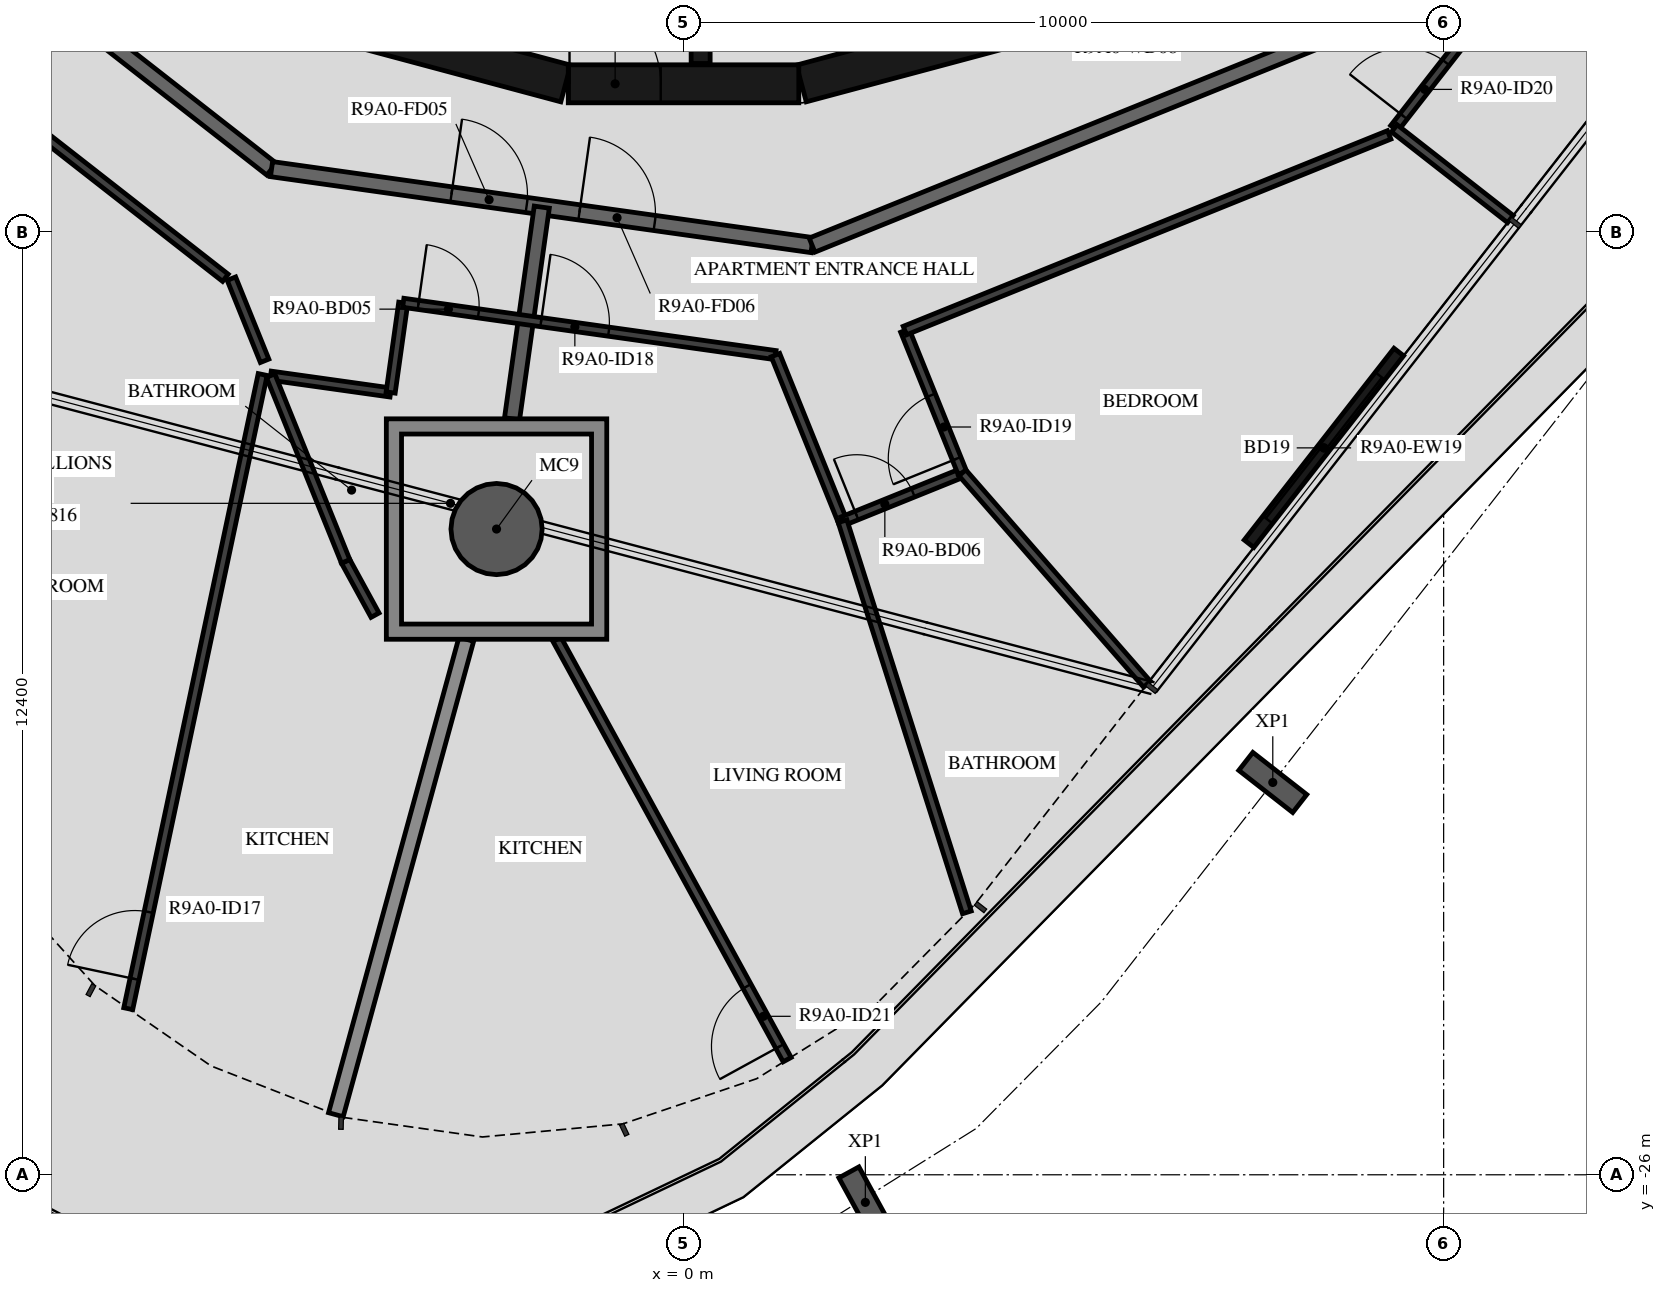
"""IFC4 building model, lengths in metres.
Left out: names, types, materials, properties, quantities, classifications, styles, units other than length and angle.
Written with IfcOpenShell. Run it as: python <this file> out.ifc"""

import sys

from ifc_helpers import new_model, si_unit, direction, frame, frame_2d, origin, origin_2d, place, context, subcontext, project, spatial, polyline, rectangle, hollow_circle, i_section, outline, extrude, element, fill, save


model = new_model("IFC4")
c1 = context("Model", 3, precision=1e-05, world=origin(), true_north=direction((0.0, 1.0)))
c2 = subcontext(c1, "Body", "Model", "MODEL_VIEW")
j1 = project(units=[si_unit("LENGTHUNIT", "METRE"), si_unit("PLANEANGLEUNIT", "RADIAN")], contexts=[c1])
p1 = place(None, origin())
s1 = spatial("IfcSite", under=j1, at=p1, CompositionType="ELEMENT")
p2 = place(p1, origin())
s2 = spatial("IfcBuilding", under=s1, at=p2, CompositionType="ELEMENT")
p3 = place(p2, frame((0.0, 0.0, 333.0)))
s3 = spatial("IfcBuildingStorey", under=s2, at=p3, CompositionType="ELEMENT", Elevation=333.0)
p4 = place(p3, frame((-2.46, -17.505, -0.45), z_axis=(0.0, 0.0, 1.0), x_axis=(1.0, 0.0, 0.0)))
e1 = element("IfcColumn", 1, at=p4, inside=s3, PredefinedType="COLUMN", context=c2, shape_type="SweptSolid", body=[
    extrude(hollow_circle(Radius=0.6, WallThickness=0.03, at=origin_2d()), origin(), (0.0, 0.0, 1.0), 3.57),
])
for number, where, z_axis, x_axis in (
    (2, (2.392, -26.363, -0.45), (0.0, 0.0, 1.0), (-0.877, -0.48, 0.0)),
    (3, (7.752, -20.839, -0.45), (0.0, 0.0, 1.0), (-0.616, -0.788, 0.0)),
):
    element("IfcColumn", number, at=place(p3, frame(where, z_axis=z_axis, x_axis=x_axis)), inside=s3, PredefinedType="COLUMN", context=c2, shape_type="SweptSolid", body=[
        extrude(i_section(OverallWidth=0.3, OverallDepth=0.9, WebThickness=0.019, FlangeThickness=0.035, FilletRadius=0.03, at=origin_2d()), origin(), (0.0, 0.0, 1.0), 3.57),
    ])
p5 = place(p3, frame((7.44, -17.698, 0.0), z_axis=(0.0, 0.0, 1.0), x_axis=(0.615666248856, 0.788007024093, 0.0)))
e4 = element("IfcWall", 4, at=p5, inside=s3, PredefinedType="STANDARD", context=c2, shape_type="SweptSolid", body=[
    extrude(rectangle(XDim=3.2, YDim=0.16, at=frame_2d((1.6, 0.0))), origin(), (0.0, 0.0, 1.0), 3.12),
])
p6 = place(p5, frame((0.4, 0.0, 0.0)))
e5 = element("IfcOpeningElement", 5, at=p6, cuts=e4, PredefinedType="OPENING", context=c2, shape_type="SweptSolid", body=[
    extrude(rectangle(XDim=2.4, YDim=2.4, at=frame_2d((1.2, 1.2))), frame((0.0, 0.09, 0.0), z_axis=(0.0, -1.0, 0.0), x_axis=(1.0, 0.0, 0.0)), (0.0, 0.0, 1.0), 0.18),
])
for number, where, z_axis, x_axis in (
    (6, (1.55, -11.643, 0.0), (0.0, 0.0, 1.0), (0.966, 0.259, 0.0)),
    (7, (-4.479, -10.858, 0.0), (0.0, 0.0, 1.0), (0.966, -0.259, 0.0)),
):
    element("IfcWall", number, at=place(p3, frame(where, z_axis=z_axis, x_axis=x_axis)), inside=s3, PredefinedType="SHEAR", context=c2, shape_type="SweptSolid", body=[
        extrude(rectangle(XDim=3.033, YDim=0.5, at=frame_2d((1.516, 0.0))), origin(), (0.0, 0.0, 1.0), 3.12),
    ])
p7 = place(p3, frame((-1.516, -11.647, 0.0), z_axis=(0.0, 0.0, 1.0), x_axis=(1.0, 0.0, 0.0)))
e8 = element("IfcWall", 8, at=p7, inside=s3, PredefinedType="SHEAR", context=c2, shape_type="SweptSolid", body=[
    extrude(rectangle(XDim=3.033, YDim=0.5, at=frame_2d((1.516, 0.0))), origin(), (0.0, 0.0, 1.0), 3.12),
])
p8 = place(p7, frame((0.016, 0.0, 0.0)))
e9 = element("IfcOpeningElement", 9, at=p8, cuts=e8, PredefinedType="OPENING", context=c2, shape_type="SweptSolid", body=[
    extrude(rectangle(XDim=1.2, YDim=2.1, at=frame_2d((0.6, 1.05))), frame((0.0, 0.26, 0.0), z_axis=(0.0, -1.0, 0.0), x_axis=(1.0, 0.0, 0.0)), (0.0, 0.0, 1.0), 0.52),
])
p9 = place(p3, frame((0.225, -8.97, 0.0), z_axis=(0.0, 0.0, 1.0), x_axis=(0.0, -1.0, 0.0)))
e10 = element("IfcWall", 10, at=p9, inside=s3, PredefinedType="SHEAR", context=c2, shape_type="SweptSolid", body=[
    extrude(rectangle(XDim=2.41, YDim=0.25, at=frame_2d((1.205, 0.0))), origin(), (0.0, 0.0, 1.0), 3.12),
])
p10 = place(p3, frame((-11.079, -8.349, 0.0), z_axis=(0.0, 0.0, 1.0), x_axis=(0.78800478687, -0.615669112324, 0.0)))
e11 = element("IfcWall", 11, at=p10, inside=s3, PredefinedType="STANDARD", context=c2, shape_type="SweptSolid", body=[
    extrude(rectangle(XDim=7.181, YDim=0.2, at=frame_2d((3.591, 0.0))), origin(), (0.0, 0.0, 1.0), 3.12),
])
p11 = place(p3, frame((-5.42, -12.77, 0.0), z_axis=(0.0, 0.0, 1.0), x_axis=(0.990270565508, -0.139155334385, 0.0)))
e12 = element("IfcWall", 12, at=p11, inside=s3, PredefinedType="STANDARD", context=c2, shape_type="SweptSolid", body=[
    extrude(rectangle(XDim=7.181, YDim=0.2, at=frame_2d((3.59, 0.0))), origin(), (0.0, 0.0, 1.0), 3.12),
])
p12 = place(p11, frame((2.39, 0.0, 0.0)))
e13 = element("IfcOpeningElement", 13, at=p12, cuts=e12, PredefinedType="OPENING", context=c2, shape_type="SweptSolid", body=[
    extrude(rectangle(XDim=1.0, YDim=2.1, at=frame_2d((0.5, 1.05))), frame((0.0, 0.11, 0.0), z_axis=(0.0, -1.0, 0.0), x_axis=(1.0, 0.0, 0.0)), (0.0, 0.0, 1.0), 0.22),
])
p13 = place(p11, frame((4.091, 0.0, 0.0)))
e14 = element("IfcOpeningElement", 14, at=p13, cuts=e12, PredefinedType="OPENING", context=c2, shape_type="SweptSolid", body=[
    extrude(rectangle(XDim=1.0, YDim=2.1, at=frame_2d((0.5, 1.05))), frame((0.0, 0.11, 0.0), z_axis=(0.0, -1.0, 0.0), x_axis=(1.0, 0.0, 0.0)), (0.0, 0.0, 1.0), 0.22),
])
p14 = place(p3, frame((1.691, -13.769, 0.0), z_axis=(0.0, 0.0, 1.0), x_axis=(0.92717916932, 0.374618189599, 0.0)))
e15 = element("IfcWall", 15, at=p14, inside=s3, PredefinedType="STANDARD", context=c2, shape_type="SweptSolid", body=[
    extrude(rectangle(XDim=7.181, YDim=0.2, at=frame_2d((3.591, 0.0))), origin(), (0.0, 0.0, 1.0), 3.12),
])
p15 = place(p3, frame((-2.256, -16.055, 0.0), z_axis=(0.0, 0.0, 1.0), x_axis=(0.139148428478, 0.990271535919, 0.0)))
e16 = element("IfcWall", 16, at=p15, inside=s3, PredefinedType="STANDARD", context=c2, shape_type="SweptSolid", body=[
    extrude(rectangle(XDim=2.812, YDim=0.2, at=frame_2d((1.406, 0.0))), origin(), (0.0, 0.0, 1.0), 3.12),
])
p16 = place(p3, frame((-4.574, -25.21, 0.0), z_axis=(0.0, 0.0, 1.0), x_axis=(0.264579024648, 0.964364007892, 0.0)))
e17 = element("IfcWall", 17, at=p16, inside=s3, PredefinedType="STANDARD", context=c2, shape_type="SweptSolid", body=[
    extrude(rectangle(XDim=6.486, YDim=0.2, at=frame_2d((3.243, 0.0))), origin(), (0.0, 0.0, 1.0), 2.73),
])
p17 = place(p3, frame((-12.319, -9.283, 0.0), z_axis=(0.0, 0.0, 1.0), x_axis=(0.788000268464, -0.61567489546, 0.0)))
e18 = element("IfcWall", 18, at=p17, inside=s3, PredefinedType="PARTITIONING", context=c2, shape_type="SweptSolid", body=[
    extrude(rectangle(XDim=7.985, YDim=0.12, at=frame_2d((3.992, 0.0))), origin(), (0.0, 0.0, 1.0), 3.12),
])
p18 = place(p17, frame((3.619, 0.0, 0.0)))
e19 = element("IfcOpeningElement", 19, at=p18, cuts=e18, PredefinedType="OPENING", context=c2, shape_type="SweptSolid", body=[
    extrude(rectangle(XDim=0.9, YDim=2.1, at=frame_2d((0.45, 1.05))), frame((0.0, 0.07, 0.0), z_axis=(0.0, -1.0, 0.0), x_axis=(1.0, 0.0, 0.0)), (0.0, 0.0, 1.0), 0.14),
])
p19 = place(p3, frame((-5.948, -14.21, 0.0), z_axis=(0.0, 0.0, 1.0), x_axis=(0.374601530156, -0.927185900241, 0.0)))
e20 = element("IfcWall", 20, at=p19, inside=s3, PredefinedType="PARTITIONING", context=c2, shape_type="SweptSolid", body=[
    extrude(rectangle(XDim=1.166, YDim=0.12, at=frame_2d((0.583, 0.0))), origin(), (0.0, 0.0, 1.0), 3.12),
])
p20 = place(p3, frame((-5.433, -15.487, 0.0), z_axis=(0.0, 0.0, 1.0), x_axis=(0.990268451053, -0.139170380644, 0.0)))
e21 = element("IfcWall", 21, at=p20, inside=s3, PredefinedType="PARTITIONING", context=c2, shape_type="SweptSolid", body=[
    extrude(rectangle(XDim=1.595, YDim=0.12, at=frame_2d((0.797, 0.0))), origin(), (0.0, 0.0, 1.0), 3.12),
])
p21 = place(p3, frame((-3.854, -15.708, 0.0), z_axis=(0.0, 0.0, 1.0), x_axis=(0.139298773474, 0.99025039849, 0.0)))
e22 = element("IfcWall", 22, at=p21, inside=s3, PredefinedType="PARTITIONING", context=c2, shape_type="SweptSolid", body=[
    extrude(rectangle(XDim=1.192, YDim=0.12, at=frame_2d((0.596, 0.0))), origin(), (0.0, 0.0, 1.0), 3.12),
])
p22 = place(p3, frame((-3.688, -14.528, 0.0), z_axis=(0.0, 0.0, 1.0), x_axis=(0.990273698817, -0.139133035013, 0.0)))
e23 = element("IfcWall", 23, at=p22, inside=s3, PredefinedType="PARTITIONING", context=c2, shape_type="SweptSolid", body=[
    extrude(rectangle(XDim=4.945, YDim=0.12, at=frame_2d((2.472, 0.0))), origin(), (0.0, 0.0, 1.0), 3.12),
])
p23 = place(p22, frame((0.2, 0.0, 0.0)))
e24 = element("IfcOpeningElement", 24, at=p23, cuts=e23, PredefinedType="OPENING", context=c2, shape_type="SweptSolid", body=[
    extrude(rectangle(XDim=0.8, YDim=2.1, at=frame_2d((0.4, 1.05))), frame((0.0, 0.07, 0.0), z_axis=(0.0, -1.0, 0.0), x_axis=(1.0, 0.0, 0.0)), (0.0, 0.0, 1.0), 0.14),
])
p24 = place(p22, frame((1.83, 0.0, 0.0)))
e25 = element("IfcOpeningElement", 25, at=p24, cuts=e23, PredefinedType="OPENING", context=c2, shape_type="SweptSolid", body=[
    extrude(rectangle(XDim=0.9, YDim=2.1, at=frame_2d((0.45, 1.05))), frame((0.0, 0.07, 0.0), z_axis=(0.0, -1.0, 0.0), x_axis=(1.0, 0.0, 0.0)), (0.0, 0.0, 1.0), 0.14),
])
p25 = place(p3, frame((-7.305, -23.815, 0.0), z_axis=(0.0, 0.0, 1.0), x_axis=(0.207366409306, 0.978263345062, 0.0)))
e26 = element("IfcWall", 26, at=p25, inside=s3, PredefinedType="PARTITIONING", context=c2, shape_type="SweptSolid", body=[
    extrude(rectangle(XDim=8.529, YDim=0.12, at=frame_2d((4.264, 0.0))), origin(), (0.0, 0.0, 1.0), 3.12),
])
p26 = place(p25, frame((0.4, 0.0, 0.0)))
e27 = element("IfcOpeningElement", 27, at=p26, cuts=e26, PredefinedType="OPENING", context=c2, shape_type="SweptSolid", body=[
    extrude(rectangle(XDim=0.9, YDim=2.1, at=frame_2d((0.45, 1.05))), frame((0.0, 0.07, 0.0), z_axis=(0.0, -1.0, 0.0), x_axis=(1.0, 0.0, 0.0)), (0.0, 0.0, 1.0), 0.14),
])
p27 = place(p3, frame((-4.059, -18.638, 0.0), z_axis=(0.0, 0.0, 1.0), x_axis=(-0.479488268542, 0.877548289458, 0.0)))
e28 = element("IfcWall", 28, at=p27, inside=s3, PredefinedType="PARTITIONING", context=c2, shape_type="SweptSolid", body=[
    extrude(rectangle(XDim=0.807, YDim=0.12, at=frame_2d((0.403, 0.0))), origin(), (0.0, 0.0, 1.0), 3.12),
])
p28 = place(p3, frame((-4.445, -17.93, 0.0), z_axis=(0.0, 0.0, 1.0), x_axis=(-0.374614676827, 0.927180588616, 0.0)))
e29 = element("IfcWall", 29, at=p28, inside=s3, PredefinedType="PARTITIONING", context=c2, shape_type="SweptSolid", body=[
    extrude(rectangle(XDim=2.635, YDim=0.12, at=frame_2d((1.318, 0.0))), origin(), (0.0, 0.0, 1.0), 3.12),
])
p29 = place(p3, frame((1.209, -15.216, 0.0), z_axis=(0.0, 0.0, 1.0), x_axis=(0.374531550488, -0.927214170345, 0.0)))
e30 = element("IfcWall", 30, at=p29, inside=s3, PredefinedType="PARTITIONING", context=c2, shape_type="SweptSolid", body=[
    extrude(rectangle(XDim=2.357, YDim=0.12, at=frame_2d((1.179, 0.0))), origin(), (0.0, 0.0, 1.0), 3.12),
])
p30 = place(p3, frame((2.092, -17.402, 0.0), z_axis=(0.0, 0.0, 1.0), x_axis=(0.927153589835, 0.374681492546, 0.0)))
e31 = element("IfcWall", 31, at=p30, inside=s3, PredefinedType="PARTITIONING", context=c2, shape_type="SweptSolid", body=[
    extrude(rectangle(XDim=1.7, YDim=0.12, at=frame_2d((0.85, 0.0))), origin(), (0.0, 0.0, 1.0), 3.12),
])
p31 = place(p30, frame((0.2, 0.0, 0.0)))
e32 = element("IfcOpeningElement", 32, at=p31, cuts=e31, PredefinedType="OPENING", context=c2, shape_type="SweptSolid", body=[
    extrude(rectangle(XDim=0.8, YDim=2.1, at=frame_2d((0.4, 1.05))), frame((0.0, 0.07, 0.0), z_axis=(0.0, -1.0, 0.0), x_axis=(1.0, 0.0, 0.0)), (0.0, 0.0, 1.0), 0.14),
])
p32 = place(p3, frame((3.668, -16.765, 0.0), z_axis=(0.0, 0.0, 1.0), x_axis=(-0.374621045498, 0.927178015416, 0.0)))
e33 = element("IfcWall", 33, at=p32, inside=s3, PredefinedType="PARTITIONING", context=c2, shape_type="SweptSolid", body=[
    extrude(rectangle(XDim=2.018, YDim=0.12, at=frame_2d((1.009, 0.0))), origin(), (0.0, 0.0, 1.0), 3.12),
])
p33 = place(p32, frame((0.2, 0.0, 0.0)))
e34 = element("IfcOpeningElement", 34, at=p33, cuts=e33, PredefinedType="OPENING", context=c2, shape_type="SweptSolid", body=[
    extrude(rectangle(XDim=0.9, YDim=2.1, at=frame_2d((0.45, 1.05))), frame((0.0, 0.07, 0.0), z_axis=(0.0, -1.0, 0.0), x_axis=(1.0, 0.0, 0.0)), (0.0, 0.0, 1.0), 0.14),
])
p34 = place(p3, frame((2.912, -14.894, 0.0), z_axis=(0.0, 0.0, 1.0), x_axis=(0.927182280165, 0.374610490174, 0.0)))
e35 = element("IfcWall", 35, at=p34, inside=s3, PredefinedType="PARTITIONING", context=c2, shape_type="SweptSolid", body=[
    extrude(rectangle(XDim=6.872, YDim=0.12, at=frame_2d((3.436, 0.0))), origin(), (0.0, 0.0, 1.0), 3.12),
])
p35 = place(p3, frame((9.351, -12.233, 0.0), z_axis=(0.0, 0.0, 1.0), x_axis=(0.615678207218, 0.787997680933, 0.0)))
e36 = element("IfcWall", 36, at=p35, inside=s3, PredefinedType="PARTITIONING", context=c2, shape_type="SweptSolid", body=[
    extrude(rectangle(XDim=7.765, YDim=0.12, at=frame_2d((3.883, 0.0))), origin(), (0.0, 0.0, 1.0), 3.12),
])
p36 = place(p35, frame((0.2, 0.0, 0.0)))
e37 = element("IfcOpeningElement", 37, at=p36, cuts=e36, PredefinedType="OPENING", context=c2, shape_type="SweptSolid", body=[
    extrude(rectangle(XDim=0.9, YDim=2.1, at=frame_2d((0.45, 1.05))), frame((0.0, 0.07, 0.0), z_axis=(0.0, -1.0, 0.0), x_axis=(1.0, 0.0, 0.0)), (0.0, 0.0, 1.0), 0.14),
])
p37 = place(p3, frame((1.363, -24.485, 0.0), z_axis=(0.0, 0.0, 1.0), x_axis=(-0.480397592444, 0.877050827018, 0.0)))
e38 = element("IfcWall", 38, at=p37, inside=s3, PredefinedType="PARTITIONING", context=c2, shape_type="SweptSolid", body=[
    extrude(rectangle(XDim=6.306, YDim=0.12, at=frame_2d((3.153, 0.0))), origin(), (0.0, 0.0, 1.0), 2.73),
])
p38 = place(p37, frame((0.2, 0.0, 0.0)))
e39 = element("IfcOpeningElement", 39, at=p38, cuts=e38, PredefinedType="OPENING", context=c2, shape_type="SweptSolid", body=[
    extrude(rectangle(XDim=0.9, YDim=2.1, at=frame_2d((0.45, 1.05))), frame((0.0, 0.07, 0.0), z_axis=(0.0, -1.0, 0.0), x_axis=(1.0, 0.0, 0.0)), (0.0, 0.0, 1.0), 0.14),
])
p39 = place(p3, frame((3.728, -22.548, 0.0), z_axis=(0.0, 0.0, 1.0), x_axis=(-0.302890110312, 0.953025488156, 0.0)))
e40 = element("IfcWall", 40, at=p39, inside=s3, PredefinedType="PARTITIONING", context=c2, shape_type="SweptSolid", body=[
    extrude(rectangle(XDim=5.4, YDim=0.12, at=frame_2d((2.7, 0.0))), origin(), (0.0, 0.0, 1.0), 3.12),
])
p40 = place(p3, frame((6.097, -19.546, 0.0), z_axis=(0.0, 0.0, 1.0), x_axis=(-0.657863093444, 0.753137537429, 0.0)))
e41 = element("IfcWall", 41, at=p40, inside=s3, PredefinedType="PARTITIONING", context=c2, shape_type="SweptSolid", body=[
    extrude(rectangle(XDim=3.693, YDim=0.12, at=frame_2d((1.846, 0.0))), origin(), (0.0, 0.0, 1.0), 2.73),
])
p41 = place(p3, frame((10.878, -13.427, 0.0), z_axis=(0.0, 0.0, 1.0), x_axis=(-0.787980458379, 0.615700249483, 0.0)))
e42 = element("IfcWall", 42, at=p41, inside=s3, PredefinedType="PARTITIONING", context=c2, shape_type="SweptSolid", body=[
    extrude(rectangle(XDim=1.939, YDim=0.12, at=frame_2d((0.969, 0.0))), origin(), (0.0, 0.0, 1.0), 2.73),
])
p42 = place(p3, origin())
e43 = element("IfcWall", 43, at=p42, inside=s3, PredefinedType="STANDARD", context=c2, shape_type="SweptSolid", body=[
    extrude(outline(polyline([(-1.01, -16.055), (-1.01, -18.955), (-3.91, -18.955), (-3.91, -16.055), (-1.01, -16.055)]), holes=[polyline([(-3.71, -18.755), (-1.21, -18.755), (-1.21, -16.255), (-3.71, -16.255), (-3.71, -18.755)])]), origin(), (0.0, 0.0, 1.0), 3.12),
])
p43 = place(p6, origin())
e44 = element("IfcDoor", 44, at=p43, inside=s3, OperationType="DOUBLE_DOOR_SLIDING", PredefinedType="DOOR", context=c2, shape_type="SweptSolid", body=[
    extrude(rectangle(XDim=2.4, YDim=2.4, at=frame_2d((1.2, 1.2))), frame((0.0, 0.025, 0.0), z_axis=(0.0, -1.0, 0.0), x_axis=(1.0, 0.0, 0.0)), (0.0, 0.0, 1.0), 0.05),
])
fill(e5, e44)
p44 = place(p8, origin())
e45 = element("IfcDoor", 45, at=p44, inside=s3, OperationType="SINGLE_SWING_RIGHT", PredefinedType="DOOR", context=c2, shape_type="SweptSolid", body=[
    extrude(rectangle(XDim=1.2, YDim=2.1, at=frame_2d((0.6, 1.05))), frame((0.0, 0.025, 0.0), z_axis=(0.0, -1.0, 0.0), x_axis=(1.0, 0.0, 0.0)), (0.0, 0.0, 1.0), 0.05),
])
fill(e9, e45)
p45 = place(p12, origin())
e46 = element("IfcDoor", 46, at=p45, inside=s3, OperationType="SINGLE_SWING_RIGHT", PredefinedType="DOOR", context=c2, shape_type="SweptSolid", body=[
    extrude(rectangle(XDim=1.0, YDim=2.1, at=frame_2d((0.5, 1.05))), frame((0.0, 0.025, 0.0), z_axis=(0.0, -1.0, 0.0), x_axis=(1.0, 0.0, 0.0)), (0.0, 0.0, 1.0), 0.05),
])
fill(e13, e46)
p46 = place(p23, origin())
e47 = element("IfcDoor", 47, at=p46, inside=s3, OperationType="SINGLE_SWING_RIGHT", PredefinedType="DOOR", context=c2, shape_type="SweptSolid", body=[
    extrude(rectangle(XDim=0.8, YDim=2.1, at=frame_2d((0.4, 1.05))), frame((0.0, 0.025, 0.0), z_axis=(0.0, -1.0, 0.0), x_axis=(1.0, 0.0, 0.0)), (0.0, 0.0, 1.0), 0.05),
])
fill(e24, e47)
p47 = place(p26, origin())
e48 = element("IfcDoor", 48, at=p47, inside=s3, OperationType="SINGLE_SWING_RIGHT", PredefinedType="DOOR", context=c2, shape_type="SweptSolid", body=[
    extrude(rectangle(XDim=0.9, YDim=2.1, at=frame_2d((0.45, 1.05))), frame((0.0, 0.025, 0.0), z_axis=(0.0, -1.0, 0.0), x_axis=(1.0, 0.0, 0.0)), (0.0, 0.0, 1.0), 0.05),
])
fill(e27, e48)
p48 = place(p13, origin())
e49 = element("IfcDoor", 49, at=p48, inside=s3, OperationType="SINGLE_SWING_RIGHT", PredefinedType="DOOR", context=c2, shape_type="SweptSolid", body=[
    extrude(rectangle(XDim=1.0, YDim=2.1, at=frame_2d((0.5, 1.05))), frame((0.0, 0.025, 0.0), z_axis=(0.0, -1.0, 0.0), x_axis=(1.0, 0.0, 0.0)), (0.0, 0.0, 1.0), 0.05),
])
fill(e14, e49)
p49 = place(p24, origin())
e50 = element("IfcDoor", 50, at=p49, inside=s3, OperationType="SINGLE_SWING_RIGHT", PredefinedType="DOOR", context=c2, shape_type="SweptSolid", body=[
    extrude(rectangle(XDim=0.9, YDim=2.1, at=frame_2d((0.45, 1.05))), frame((0.0, 0.025, 0.0), z_axis=(0.0, -1.0, 0.0), x_axis=(1.0, 0.0, 0.0)), (0.0, 0.0, 1.0), 0.05),
])
fill(e25, e50)
p50 = place(p31, origin())
e51 = element("IfcDoor", 51, at=p50, inside=s3, OperationType="SINGLE_SWING_LEFT", PredefinedType="DOOR", context=c2, shape_type="SweptSolid", body=[
    extrude(rectangle(XDim=0.8, YDim=2.1, at=frame_2d((0.4, 1.05))), frame((0.0, 0.025, 0.0), z_axis=(0.0, -1.0, 0.0), x_axis=(1.0, 0.0, 0.0)), (0.0, 0.0, 1.0), 0.05),
])
fill(e32, e51)
p51 = place(p33, origin())
e52 = element("IfcDoor", 52, at=p51, inside=s3, OperationType="SINGLE_SWING_RIGHT", PredefinedType="DOOR", context=c2, shape_type="SweptSolid", body=[
    extrude(rectangle(XDim=0.9, YDim=2.1, at=frame_2d((0.45, 1.05))), frame((0.0, 0.025, 0.0), z_axis=(0.0, -1.0, 0.0), x_axis=(1.0, 0.0, 0.0)), (0.0, 0.0, 1.0), 0.05),
])
fill(e34, e52)
p52 = place(p36, origin())
e53 = element("IfcDoor", 53, at=p52, inside=s3, OperationType="SINGLE_SWING_LEFT", PredefinedType="DOOR", context=c2, shape_type="SweptSolid", body=[
    extrude(rectangle(XDim=0.9, YDim=2.1, at=frame_2d((0.45, 1.05))), frame((0.0, 0.025, 0.0), z_axis=(0.0, -1.0, 0.0), x_axis=(1.0, 0.0, 0.0)), (0.0, 0.0, 1.0), 0.05),
])
fill(e37, e53)
p53 = place(p38, origin())
e54 = element("IfcDoor", 54, at=p53, inside=s3, OperationType="SINGLE_SWING_LEFT", PredefinedType="DOOR", context=c2, shape_type="SweptSolid", body=[
    extrude(rectangle(XDim=0.9, YDim=2.1, at=frame_2d((0.45, 1.05))), frame((0.0, 0.025, 0.0), z_axis=(0.0, -1.0, 0.0), x_axis=(1.0, 0.0, 0.0)), (0.0, 0.0, 1.0), 0.05),
])
fill(e39, e54)
save(model, sys.argv[1])
